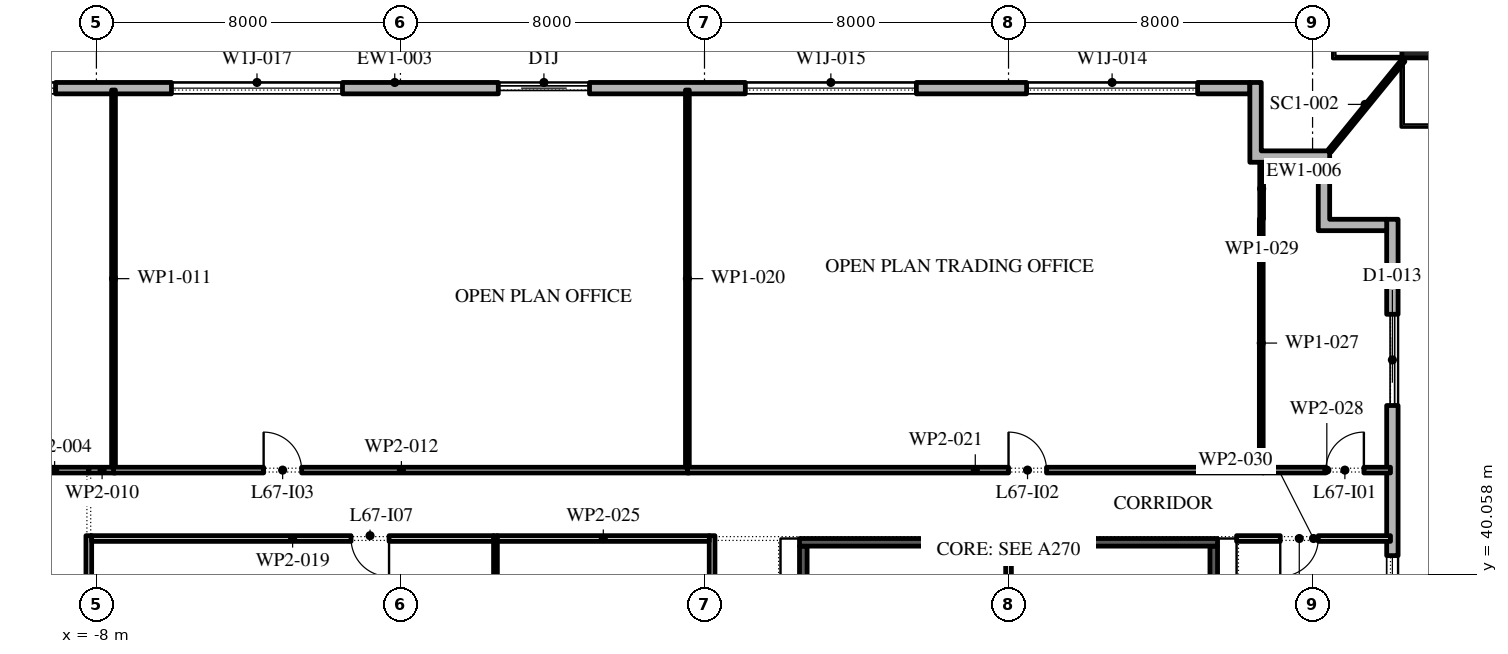
"""IFC4 building model, lengths in metres.
Left out: names, types, materials, properties, quantities, classifications, styles, units other than length and angle.
Written with IfcOpenShell. Run it as: python <this file> out.ifc"""

import sys

from ifc_helpers import new_model, si_unit, direction, frame, frame_2d, origin, origin_2d, place, context, subcontext, project, spatial, polyline, rectangle, outline, extrude, element, fill, save


model = new_model("IFC4")
c1 = context("Model", 3, precision=1e-05, world=origin(), true_north=direction((0.0, 1.0)))
c2 = subcontext(c1, "Body", "Model", "MODEL_VIEW")
j1 = project(units=[si_unit("LENGTHUNIT", "METRE"), si_unit("PLANEANGLEUNIT", "RADIAN")], contexts=[c1])
p1 = place(None, origin())
s1 = spatial("IfcSite", under=j1, at=p1, CompositionType="ELEMENT")
p2 = place(p1, origin())
s2 = spatial("IfcBuilding", under=s1, at=p2, CompositionType="ELEMENT")
p3 = place(p2, frame((0.0, 0.0, 309.0)))
s3 = spatial("IfcBuildingStorey", under=s2, at=p3, CompositionType="ELEMENT", Elevation=309.0)
p4 = place(p3, frame((26.85, 54.146, 0.0), z_axis=(0.0, 0.090540965689, 0.995892731941), x_axis=(-1.0, 0.0, 0.0)))
e1 = element("IfcColumn", 1, at=p4, inside=s3, PredefinedType="COLUMN", context=c2, shape_type="SweptSolid", body=[
    extrude(rectangle(XDim=1.0, YDim=1.0, at=origin_2d()), origin(), (0.0, 0.0, 1.0), 4.217),
])
p5 = place(p3, frame((26.1, -2.1, 0.0), z_axis=(0.0, 0.0, 1.0), x_axis=(0.0, 1.0, 0.0)))
e2 = element("IfcWall", 2, at=p5, inside=s3, PredefinedType="STANDARD", context=c2, shape_type="SweptSolid", body=[
    extrude(rectangle(XDim=51.5, YDim=0.3, at=frame_2d((25.75, 0.0))), origin(), (0.0, 0.0, 1.0), 4.0),
])
p6 = place(p5, frame((1.3, 0.0, 0.45)))
e3 = element("IfcOpeningElement", 3, at=p6, cuts=e2, PredefinedType="OPENING", context=c2, shape_type="SweptSolid", body=[
    extrude(rectangle(XDim=4.5, YDim=3.05, at=frame_2d((2.25, 1.525))), frame((0.0, 0.16, 0.0), z_axis=(0.0, -1.0, 0.0), x_axis=(1.0, 0.0, 0.0)), (0.0, 0.0, 1.0), 0.32),
])
p7 = place(p5, frame((8.55, 0.0, 0.45)))
e4 = element("IfcOpeningElement", 4, at=p7, cuts=e2, PredefinedType="OPENING", context=c2, shape_type="SweptSolid", body=[
    extrude(rectangle(XDim=4.5, YDim=3.05, at=frame_2d((2.25, 1.525))), frame((0.0, 0.16, 0.0), z_axis=(0.0, -1.0, 0.0), x_axis=(1.0, 0.0, 0.0)), (0.0, 0.0, 1.0), 0.32),
])
p8 = place(p5, frame((17.0, 0.0, 0.0)))
e5 = element("IfcOpeningElement", 5, at=p8, cuts=e2, PredefinedType="OPENING", context=c2, shape_type="SweptSolid", body=[
    extrude(rectangle(XDim=2.4, YDim=3.5, at=frame_2d((1.2, 1.75))), frame((0.0, 0.16, 0.0), z_axis=(0.0, -1.0, 0.0), x_axis=(1.0, 0.0, 0.0)), (0.0, 0.0, 1.0), 0.32),
])
p9 = place(p5, frame((23.35, 0.0, 0.45)))
e6 = element("IfcOpeningElement", 6, at=p9, cuts=e2, PredefinedType="OPENING", context=c2, shape_type="SweptSolid", body=[
    extrude(rectangle(XDim=4.5, YDim=3.05, at=frame_2d((2.25, 1.525))), frame((0.0, 0.16, 0.0), z_axis=(0.0, -1.0, 0.0), x_axis=(1.0, 0.0, 0.0)), (0.0, 0.0, 1.0), 0.32),
])
p10 = place(p5, frame((30.75, 0.0, 0.45)))
e7 = element("IfcOpeningElement", 7, at=p10, cuts=e2, PredefinedType="OPENING", context=c2, shape_type="SweptSolid", body=[
    extrude(rectangle(XDim=4.5, YDim=3.05, at=frame_2d((2.25, 1.525))), frame((0.0, 0.16, 0.0), z_axis=(0.0, -1.0, 0.0), x_axis=(1.0, 0.0, 0.0)), (0.0, 0.0, 1.0), 0.32),
])
p11 = place(p5, frame((38.15, 0.0, 0.45)))
e8 = element("IfcOpeningElement", 8, at=p11, cuts=e2, PredefinedType="OPENING", context=c2, shape_type="SweptSolid", body=[
    extrude(rectangle(XDim=4.5, YDim=3.05, at=frame_2d((2.25, 1.525))), frame((0.0, 0.16, 0.0), z_axis=(0.0, -1.0, 0.0), x_axis=(1.0, 0.0, 0.0)), (0.0, 0.0, 1.0), 0.32),
])
p12 = place(p5, frame((46.6, 0.0, 0.0)))
e9 = element("IfcOpeningElement", 9, at=p12, cuts=e2, PredefinedType="OPENING", context=c2, shape_type="SweptSolid", body=[
    extrude(rectangle(XDim=2.4, YDim=3.5, at=frame_2d((1.2, 1.75))), frame((0.0, 0.16, 0.0), z_axis=(0.0, -1.0, 0.0), x_axis=(1.0, 0.0, 0.0)), (0.0, 0.0, 1.0), 0.32),
])
p13 = place(p3, frame((22.35, 52.85, 0.0), z_axis=(0.0, 0.0, 1.0), x_axis=(-1.0, 0.0, 0.0)))
e10 = element("IfcWall", 10, at=p13, inside=s3, PredefinedType="STANDARD", context=c2, shape_type="SweptSolid", body=[
    extrude(rectangle(XDim=45.0, YDim=0.3, at=frame_2d((22.5, 0.0))), origin(), (0.0, 0.0, 1.0), 4.0),
])
p14 = place(p13, frame((1.375, 0.0, 0.45)))
e11 = element("IfcOpeningElement", 11, at=p14, cuts=e10, PredefinedType="OPENING", context=c2, shape_type="SweptSolid", body=[
    extrude(rectangle(XDim=4.5, YDim=2.675, at=frame_2d((2.25, 1.337))), frame((0.0, 0.16, 0.0), z_axis=(0.0, -1.0, 0.0), x_axis=(1.0, 0.0, 0.0)), (0.0, 0.0, 1.0), 0.32),
])
p15 = place(p13, frame((8.775, 0.0, 0.45)))
e12 = element("IfcOpeningElement", 12, at=p15, cuts=e10, PredefinedType="OPENING", context=c2, shape_type="SweptSolid", body=[
    extrude(rectangle(XDim=4.5, YDim=2.675, at=frame_2d((2.25, 1.337))), frame((0.0, 0.16, 0.0), z_axis=(0.0, -1.0, 0.0), x_axis=(1.0, 0.0, 0.0)), (0.0, 0.0, 1.0), 0.32),
])
p16 = place(p13, frame((17.375, 0.0, 0.0)))
e13 = element("IfcOpeningElement", 13, at=p16, cuts=e10, PredefinedType="OPENING", context=c2, shape_type="SweptSolid", body=[
    extrude(rectangle(XDim=2.4, YDim=3.125, at=frame_2d((1.2, 1.562))), frame((0.0, 0.16, 0.0), z_axis=(0.0, -1.0, 0.0), x_axis=(1.0, 0.0, 0.0)), (0.0, 0.0, 1.0), 0.32),
])
p17 = place(p13, frame((23.875, 0.0, 0.45)))
e14 = element("IfcOpeningElement", 14, at=p17, cuts=e10, PredefinedType="OPENING", context=c2, shape_type="SweptSolid", body=[
    extrude(rectangle(XDim=4.5, YDim=2.675, at=frame_2d((2.25, 1.337))), frame((0.0, 0.16, 0.0), z_axis=(0.0, -1.0, 0.0), x_axis=(1.0, 0.0, 0.0)), (0.0, 0.0, 1.0), 0.32),
])
p18 = place(p13, frame((31.425, 0.0, 0.45)))
e15 = element("IfcOpeningElement", 15, at=p18, cuts=e10, PredefinedType="OPENING", context=c2, shape_type="SweptSolid", body=[
    extrude(rectangle(XDim=4.5, YDim=2.675, at=frame_2d((2.25, 1.337))), frame((0.0, 0.16, 0.0), z_axis=(0.0, -1.0, 0.0), x_axis=(1.0, 0.0, 0.0)), (0.0, 0.0, 1.0), 0.32),
])
p19 = place(p13, frame((38.975, 0.0, 0.45)))
e16 = element("IfcOpeningElement", 16, at=p19, cuts=e10, PredefinedType="OPENING", context=c2, shape_type="SweptSolid", body=[
    extrude(rectangle(XDim=4.5, YDim=2.675, at=frame_2d((2.25, 1.337))), frame((0.0, 0.16, 0.0), z_axis=(0.0, -1.0, 0.0), x_axis=(1.0, 0.0, 0.0)), (0.0, 0.0, 1.0), 0.32),
])
p20 = place(p3, origin())
e17 = element("IfcWall", 17, at=p20, inside=s3, PredefinedType="STANDARD", context=c2, shape_type="SweptSolid", body=[
    extrude(outline(polyline([(24.15, 50.9), (22.35, 50.9), (22.35, 53.0), (22.65, 53.0), (22.65, 51.2), (24.45, 51.2), (24.45, 49.4), (25.95, 49.4), (25.95, 49.1), (24.15, 49.1), (24.15, 50.9)])), origin(), (0.0, 0.0, 1.0), 4.0),
])
p21 = place(p3, frame((24.45, 51.2, -0.05), z_axis=(0.0, 0.0, 1.0), x_axis=(0.631657032083, 0.775247956347, 0.0)))
e18 = element("IfcWall", 18, at=p21, inside=s3, PredefinedType="STANDARD", context=c2, shape_type="SweptSolid", body=[
    extrude(rectangle(XDim=3.072, YDim=0.1, at=frame_2d((1.536, 0.0))), origin(), (0.0, 0.0, 1.0), 4.05),
])
p22 = place(p3, frame((21.4, 25.75, 0.0), z_axis=(0.0, 0.0, 1.0), x_axis=(0.0, 1.0, 0.0)))
e19 = element("IfcWall", 19, at=p22, inside=s3, PredefinedType="SHEAR", context=c2, shape_type="SweptSolid", body=[
    extrude(rectangle(XDim=15.05, YDim=0.2, at=frame_2d((7.525, 0.0))), origin(), (0.0, 0.0, 1.0), 4.0),
])
p23 = place(p22, frame((7.075, 0.0, 0.0)))
e20 = element("IfcOpeningElement", 20, at=p23, cuts=e19, PredefinedType="OPENING", context=c2, shape_type="SweptSolid", body=[
    extrude(rectangle(XDim=0.9, YDim=2.1, at=frame_2d((0.45, 1.05))), frame((0.0, 0.11, 0.0), z_axis=(0.0, -1.0, 0.0), x_axis=(1.0, 0.0, 0.0)), (0.0, 0.0, 1.0), 0.22),
])
p24 = place(p3, frame((10.6, 25.75, 0.0), z_axis=(0.0, 0.0, 1.0), x_axis=(0.0, 1.0, 0.0)))
e21 = element("IfcWall", 21, at=p24, inside=s3, PredefinedType="SHEAR", context=c2, shape_type="SweptSolid", body=[
    extrude(rectangle(XDim=15.05, YDim=0.2, at=frame_2d((7.525, 0.0))), origin(), (0.0, 0.0, 1.0), 4.0),
])
p25 = place(p24, frame((7.075, 0.0, 0.0)))
e22 = element("IfcOpeningElement", 22, at=p25, cuts=e21, PredefinedType="OPENING", context=c2, shape_type="SweptSolid", body=[
    extrude(rectangle(XDim=0.9, YDim=2.1, at=frame_2d((0.45, 1.05))), frame((0.0, 0.11, 0.0), z_axis=(0.0, -1.0, 0.0), x_axis=(1.0, 0.0, 0.0)), (0.0, 0.0, 1.0), 0.22),
])
p26 = place(p3, frame((10.5, 40.9, 0.0), z_axis=(0.0, 0.0, 1.0), x_axis=(1.0, 0.0, 0.0)))
e23 = element("IfcWall", 23, at=p26, inside=s3, PredefinedType="SHEAR", context=c2, shape_type="SweptSolid", body=[
    extrude(rectangle(XDim=11.0, YDim=0.2, at=frame_2d((5.5, 0.0))), origin(), (0.0, 0.0, 1.0), 4.0),
])
p27 = place(p3, frame((16.0, 25.75, 0.0), z_axis=(0.0, 0.0, 1.0), x_axis=(0.0, 1.0, 0.0)))
e24 = element("IfcWall", 24, at=p27, inside=s3, PredefinedType="PARTITIONING", context=c2, shape_type="SweptSolid", body=[
    extrude(rectangle(XDim=15.05, YDim=0.15, at=frame_2d((7.525, 0.0))), origin(), (0.0, 0.0, 1.0), 4.0),
])
p28 = place(p3, frame((-10.0, 42.8, 0.0), z_axis=(0.0, 0.0, 1.0), x_axis=(1.0, 0.0, 0.0)))
e25 = element("IfcWall", 25, at=p28, inside=s3, PredefinedType="PARTITIONING", context=c2, shape_type="SweptSolid", body=[
    extrude(rectangle(XDim=1.8, YDim=0.15, at=frame_2d((0.9, 0.0))), origin(), (0.0, 0.0, 1.0), 4.0),
])
p29 = place(p3, frame((-8.2, 41.075, 0.0), z_axis=(0.0, 0.0, 1.0), x_axis=(0.0, -1.0, 0.0)))
e26 = element("IfcWall", 26, at=p29, inside=s3, PredefinedType="PARTITIONING", context=c2, shape_type="SweptSolid", body=[
    extrude(rectangle(XDim=9.575, YDim=0.15, at=frame_2d((4.788, 0.0))), origin(), (0.0, 0.0, 1.0), 4.0),
])
p30 = place(p3, frame((-8.2, 42.8, 0.0), z_axis=(0.0, 0.0, 1.0), x_axis=(1.0, 0.0, 0.0)))
e27 = element("IfcWall", 27, at=p30, inside=s3, PredefinedType="PARTITIONING", context=c2, shape_type="SweptSolid", body=[
    extrude(rectangle(XDim=0.7, YDim=0.15, at=frame_2d((0.35, 0.0))), origin(), (0.0, 0.0, 1.0), 4.0),
])
p31 = place(p3, frame((-7.55, 42.875, 0.0), z_axis=(0.0, 0.0, 1.0), x_axis=(0.0, 1.0, 0.0)))
e28 = element("IfcWall", 28, at=p31, inside=s3, PredefinedType="PARTITIONING", context=c2, shape_type="SweptSolid", body=[
    extrude(rectangle(XDim=9.925, YDim=0.1, at=frame_2d((4.962, 0.0))), origin(), (0.0, 0.0, 1.0), 4.0),
])
p32 = place(p3, frame((-7.55, 42.8, 0.0), z_axis=(0.0, 0.0, 1.0), x_axis=(1.0, 0.0, 0.0)))
e29 = element("IfcWall", 29, at=p32, inside=s3, PredefinedType="PARTITIONING", context=c2, shape_type="SweptSolid", body=[
    extrude(rectangle(XDim=15.15, YDim=0.15, at=frame_2d((7.575, 0.0))), origin(), (0.0, 0.0, 1.0), 4.0),
])
p33 = place(p32, frame((3.95, 0.0, 0.0)))
e30 = element("IfcOpeningElement", 30, at=p33, cuts=e29, PredefinedType="OPENING", context=c2, shape_type="SweptSolid", body=[
    extrude(rectangle(XDim=1.0, YDim=2.1, at=frame_2d((0.5, 1.05))), frame((0.0, 0.085, 0.0), z_axis=(0.0, -1.0, 0.0), x_axis=(1.0, 0.0, 0.0)), (0.0, 0.0, 1.0), 0.17),
])
p34 = place(p3, frame((2.5, 31.55, 0.0), z_axis=(0.0, 0.0, 1.0), x_axis=(0.0, 1.0, 0.0)))
e31 = element("IfcWall", 31, at=p34, inside=s3, PredefinedType="PARTITIONING", context=c2, shape_type="SweptSolid", body=[
    extrude(rectangle(XDim=9.525, YDim=0.1, at=frame_2d((4.762, 0.0))), origin(), (0.0, 0.0, 1.0), 4.0),
])
p35 = place(p3, frame((2.45, 41.0, 0.0), z_axis=(0.0, 0.0, 1.0), x_axis=(-1.0, 0.0, 0.0)))
e32 = element("IfcWall", 32, at=p35, inside=s3, PredefinedType="PARTITIONING", context=c2, shape_type="SweptSolid", body=[
    extrude(rectangle(XDim=10.575, YDim=0.15, at=frame_2d((5.288, 0.0))), origin(), (0.0, 0.0, 1.0), 4.0),
])
p36 = place(p35, frame((2.75, 0.0, 0.0)))
e33 = element("IfcOpeningElement", 33, at=p36, cuts=e32, PredefinedType="OPENING", context=c2, shape_type="SweptSolid", body=[
    extrude(rectangle(XDim=1.0, YDim=2.1, at=frame_2d((0.5, 1.05))), frame((0.0, 0.085, 0.0), z_axis=(0.0, -1.0, 0.0), x_axis=(1.0, 0.0, 0.0)), (0.0, 0.0, 1.0), 0.17),
])
p37 = place(p3, frame((7.55, 42.875, 0.0), z_axis=(0.0, 0.0, 1.0), x_axis=(0.0, 1.0, 0.0)))
e34 = element("IfcWall", 34, at=p37, inside=s3, PredefinedType="PARTITIONING", context=c2, shape_type="SweptSolid", body=[
    extrude(rectangle(XDim=9.925, YDim=0.1, at=frame_2d((4.962, 0.0))), origin(), (0.0, 0.0, 1.0), 4.0),
])
p38 = place(p3, frame((7.55, 42.8, 0.0), z_axis=(0.0, 0.0, 1.0), x_axis=(1.0, 0.0, 0.0)))
e35 = element("IfcWall", 35, at=p38, inside=s3, PredefinedType="PARTITIONING", context=c2, shape_type="SweptSolid", body=[
    extrude(rectangle(XDim=15.15, YDim=0.15, at=frame_2d((7.575, 0.0))), origin(), (0.0, 0.0, 1.0), 4.0),
])
p39 = place(p38, frame((8.45, 0.0, 0.0)))
e36 = element("IfcOpeningElement", 36, at=p39, cuts=e35, PredefinedType="OPENING", context=c2, shape_type="SweptSolid", body=[
    extrude(rectangle(XDim=1.0, YDim=2.1, at=frame_2d((0.5, 1.05))), frame((0.0, 0.085, 0.0), z_axis=(0.0, -1.0, 0.0), x_axis=(1.0, 0.0, 0.0)), (0.0, 0.0, 1.0), 0.17),
])
p40 = place(p3, frame((8.2, 25.5, 0.0), z_axis=(0.0, 0.0, 1.0), x_axis=(0.0, 1.0, 0.0)))
e37 = element("IfcWall", 37, at=p40, inside=s3, PredefinedType="PARTITIONING", context=c2, shape_type="SweptSolid", body=[
    extrude(rectangle(XDim=15.575, YDim=0.15, at=frame_2d((7.788, 0.0))), origin(), (0.0, 0.0, 1.0), 4.0),
])
p41 = place(p40, frame((4.1, 0.0, 0.0)))
e38 = element("IfcOpeningElement", 38, at=p41, cuts=e37, PredefinedType="OPENING", context=c2, shape_type="SweptSolid", body=[
    extrude(rectangle(XDim=1.0, YDim=2.1, at=frame_2d((0.5, 1.05))), frame((0.0, 0.085, 0.0), z_axis=(0.0, -1.0, 0.0), x_axis=(1.0, 0.0, 0.0)), (0.0, 0.0, 1.0), 0.17),
])
p42 = place(p3, frame((8.125, 41.0, 0.0), z_axis=(0.0, 0.0, 1.0), x_axis=(-1.0, 0.0, 0.0)))
e39 = element("IfcWall", 39, at=p42, inside=s3, PredefinedType="PARTITIONING", context=c2, shape_type="SweptSolid", body=[
    extrude(rectangle(XDim=5.575, YDim=0.15, at=frame_2d((2.788, 0.0))), origin(), (0.0, 0.0, 1.0), 4.0),
])
p43 = place(p3, frame((22.65, 42.875, 0.0), z_axis=(0.0, 0.0, 1.0), x_axis=(0.0, 1.0, 0.0)))
e40 = element("IfcWall", 40, at=p43, inside=s3, PredefinedType="PARTITIONING", context=c2, shape_type="SweptSolid", body=[
    extrude(rectangle(XDim=6.535, YDim=0.1, at=frame_2d((3.268, 0.0))), origin(), (0.0, 0.0, 1.0), 4.0),
])
p44 = place(p3, frame((22.7, 42.8, 0.0), z_axis=(0.0, 0.0, 1.0), x_axis=(1.0, 0.0, 0.0)))
e41 = element("IfcWall", 41, at=p44, inside=s3, PredefinedType="PARTITIONING", context=c2, shape_type="SweptSolid", body=[
    extrude(rectangle(XDim=3.35, YDim=0.15, at=frame_2d((1.675, 0.0))), origin(), (0.0, 0.0, 1.0), 4.0),
])
p45 = place(p44, frame((1.65, 0.0, 0.0)))
e42 = element("IfcOpeningElement", 42, at=p45, cuts=e41, PredefinedType="OPENING", context=c2, shape_type="SweptSolid", body=[
    extrude(rectangle(XDim=1.0, YDim=2.1, at=frame_2d((0.5, 1.05))), frame((0.0, 0.085, 0.0), z_axis=(0.0, -1.0, 0.0), x_axis=(1.0, 0.0, 0.0)), (0.0, 0.0, 1.0), 0.17),
])
p46 = place(p3, frame((22.66, 49.41, 0.0), z_axis=(0.0, 0.0, 1.0), x_axis=(0.0, 1.0, 0.0)))
e43 = element("IfcWall", 43, at=p46, inside=s3, PredefinedType="PARTITIONING", context=c2, shape_type="SweptSolid", body=[
    extrude(rectangle(XDim=1.59, YDim=0.1, at=frame_2d((0.795, 0.0))), origin(), (0.0, 0.0, 1.0), 4.0),
])
p47 = place(p3, frame((26.05, 41.0, 0.0), z_axis=(0.0, 0.0, 1.0), x_axis=(-1.0, 0.0, 0.0)))
e44 = element("IfcWall", 44, at=p47, inside=s3, PredefinedType="PARTITIONING", context=c2, shape_type="SweptSolid", body=[
    extrude(rectangle(XDim=4.05, YDim=0.15, at=frame_2d((2.025, 0.0))), origin(), (0.0, 0.0, 1.0), 4.0),
])
p48 = place(p47, frame((1.9, 0.0, 0.0)))
e45 = element("IfcOpeningElement", 45, at=p48, cuts=e44, PredefinedType="OPENING", context=c2, shape_type="SweptSolid", body=[
    extrude(rectangle(XDim=1.0, YDim=2.1, at=frame_2d((0.5, 1.05))), frame((0.0, 0.085, 0.0), z_axis=(0.0, -1.0, 0.0), x_axis=(1.0, 0.0, 0.0)), (0.0, 0.0, 1.0), 0.17),
])
p49 = place(p11, origin())
e46 = element("IfcWindow", 46, at=p49, inside=s3, PartitioningType="DOUBLE_PANEL_VERTICAL", PredefinedType="WINDOW", context=c2, shape_type="SweptSolid", body=[
    extrude(rectangle(XDim=4.5, YDim=3.05, at=frame_2d((2.25, 1.525))), frame((0.0, 0.03, 0.0), z_axis=(0.0, -1.0, 0.0), x_axis=(1.0, 0.0, 0.0)), (0.0, 0.0, 1.0), 0.06),
])
fill(e8, e46)
p50 = place(p12, origin())
e47 = element("IfcDoor", 47, at=p50, inside=s3, OperationType="DOUBLE_DOOR_SLIDING", PredefinedType="DOOR", context=c2, shape_type="SweptSolid", body=[
    extrude(rectangle(XDim=2.4, YDim=3.5, at=frame_2d((1.2, 1.75))), frame((0.0, 0.025, 0.0), z_axis=(0.0, -1.0, 0.0), x_axis=(1.0, 0.0, 0.0)), (0.0, 0.0, 1.0), 0.05),
])
fill(e9, e47)
p51 = place(p14, origin())
e48 = element("IfcWindow", 48, at=p51, inside=s3, PartitioningType="DOUBLE_PANEL_VERTICAL", PredefinedType="WINDOW", context=c2, shape_type="SweptSolid", body=[
    extrude(rectangle(XDim=4.5, YDim=2.675, at=frame_2d((2.25, 1.337))), frame((0.0, 0.03, 0.0), z_axis=(0.0, -1.0, 0.0), x_axis=(1.0, 0.0, 0.0)), (0.0, 0.0, 1.0), 0.06),
])
fill(e11, e48)
p52 = place(p15, origin())
e49 = element("IfcWindow", 49, at=p52, inside=s3, PartitioningType="DOUBLE_PANEL_VERTICAL", PredefinedType="WINDOW", context=c2, shape_type="SweptSolid", body=[
    extrude(rectangle(XDim=4.5, YDim=2.675, at=frame_2d((2.25, 1.337))), frame((0.0, 0.03, 0.0), z_axis=(0.0, -1.0, 0.0), x_axis=(1.0, 0.0, 0.0)), (0.0, 0.0, 1.0), 0.06),
])
fill(e12, e49)
p53 = place(p16, origin())
e50 = element("IfcDoor", 50, at=p53, inside=s3, OperationType="DOUBLE_DOOR_SLIDING", PredefinedType="DOOR", context=c2, shape_type="SweptSolid", body=[
    extrude(rectangle(XDim=2.4, YDim=3.125, at=frame_2d((1.2, 1.562))), frame((0.0, 0.025, 0.0), z_axis=(0.0, -1.0, 0.0), x_axis=(1.0, 0.0, 0.0)), (0.0, 0.0, 1.0), 0.05),
])
fill(e13, e50)
p54 = place(p17, origin())
e51 = element("IfcWindow", 51, at=p54, inside=s3, PartitioningType="DOUBLE_PANEL_VERTICAL", PredefinedType="WINDOW", context=c2, shape_type="SweptSolid", body=[
    extrude(rectangle(XDim=4.5, YDim=2.675, at=frame_2d((2.25, 1.337))), frame((0.0, 0.03, 0.0), z_axis=(0.0, -1.0, 0.0), x_axis=(1.0, 0.0, 0.0)), (0.0, 0.0, 1.0), 0.06),
])
fill(e14, e51)
p55 = place(p18, origin())
e52 = element("IfcWindow", 52, at=p55, inside=s3, PartitioningType="DOUBLE_PANEL_VERTICAL", PredefinedType="WINDOW", context=c2, shape_type="SweptSolid", body=[
    extrude(rectangle(XDim=4.5, YDim=2.675, at=frame_2d((2.25, 1.337))), frame((0.0, 0.03, 0.0), z_axis=(0.0, -1.0, 0.0), x_axis=(1.0, 0.0, 0.0)), (0.0, 0.0, 1.0), 0.06),
])
fill(e15, e52)
p56 = place(p45, origin())
e53 = element("IfcDoor", 53, at=p56, inside=s3, OperationType="SINGLE_SWING_LEFT", PredefinedType="DOOR", context=c2, shape_type="SweptSolid", body=[
    extrude(rectangle(XDim=1.0, YDim=2.1, at=frame_2d((0.5, 1.05))), frame((0.0, 0.025, 0.0), z_axis=(0.0, -1.0, 0.0), x_axis=(1.0, 0.0, 0.0)), (0.0, 0.0, 1.0), 0.05),
])
fill(e42, e53)
p57 = place(p39, origin())
e54 = element("IfcDoor", 54, at=p57, inside=s3, OperationType="SINGLE_SWING_RIGHT", PredefinedType="DOOR", context=c2, shape_type="SweptSolid", body=[
    extrude(rectangle(XDim=1.0, YDim=2.1, at=frame_2d((0.5, 1.05))), frame((0.0, 0.025, 0.0), z_axis=(0.0, -1.0, 0.0), x_axis=(1.0, 0.0, 0.0)), (0.0, 0.0, 1.0), 0.05),
])
fill(e36, e54)
p58 = place(p33, origin())
e55 = element("IfcDoor", 55, at=p58, inside=s3, OperationType="SINGLE_SWING_RIGHT", PredefinedType="DOOR", context=c2, shape_type="SweptSolid", body=[
    extrude(rectangle(XDim=1.0, YDim=2.1, at=frame_2d((0.5, 1.05))), frame((0.0, 0.025, 0.0), z_axis=(0.0, -1.0, 0.0), x_axis=(1.0, 0.0, 0.0)), (0.0, 0.0, 1.0), 0.05),
])
fill(e30, e55)
p59 = place(p36, origin())
e56 = element("IfcDoor", 56, at=p59, inside=s3, OperationType="SINGLE_SWING_RIGHT", PredefinedType="DOOR", context=c2, shape_type="SweptSolid", body=[
    extrude(rectangle(XDim=1.0, YDim=2.1, at=frame_2d((0.5, 1.05))), frame((0.0, 0.025, 0.0), z_axis=(0.0, -1.0, 0.0), x_axis=(1.0, 0.0, 0.0)), (0.0, 0.0, 1.0), 0.05),
])
fill(e33, e56)
p60 = place(p48, origin())
e57 = element("IfcDoor", 57, at=p60, inside=s3, OperationType="SINGLE_SWING_LEFT", PredefinedType="DOOR", context=c2, shape_type="SweptSolid", body=[
    extrude(rectangle(XDim=1.0, YDim=2.1, at=frame_2d((0.5, 1.05))), frame((0.0, 0.025, 0.0), z_axis=(0.0, -1.0, 0.0), x_axis=(1.0, 0.0, 0.0)), (0.0, 0.0, 1.0), 0.05),
])
fill(e45, e57)
save(model, sys.argv[1])
